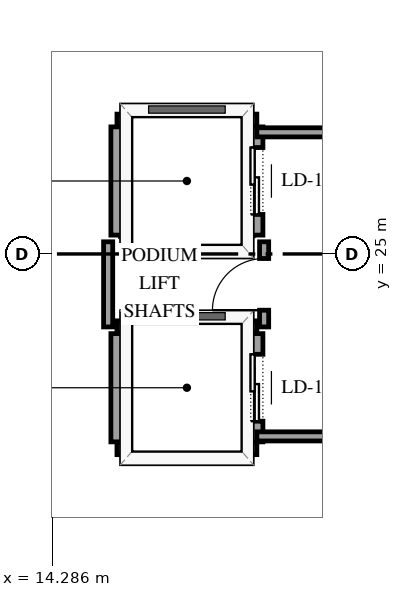
"""IFC4 building model, lengths in metres.
Left out: names, types, materials, properties, quantities, classifications, styles, units other than length and angle.
Written with IfcOpenShell. Run it as: python <this file> out.ifc"""

import sys

from ifc_helpers import new_model, si_unit, direction, frame, frame_2d, origin, place, context, subcontext, project, spatial, rectangle, extrude, element, fill, save


model = new_model("IFC4")
c1 = context("Model", 3, precision=1e-05, world=origin(), true_north=direction((0.0, 1.0)))
c2 = subcontext(c1, "Body", "Model", "MODEL_VIEW")
j1 = project(units=[si_unit("LENGTHUNIT", "METRE"), si_unit("PLANEANGLEUNIT", "RADIAN")], contexts=[c1])
p1 = place(None, origin())
s1 = spatial("IfcSite", under=j1, at=p1, CompositionType="ELEMENT")
p2 = place(p1, origin())
s2 = spatial("IfcBuilding", under=s1, at=p2, CompositionType="ELEMENT")
p3 = place(p2, frame((0.0, 0.0, -5.4)))
s3 = spatial("IfcBuildingStorey", under=s2, at=p3, CompositionType="ELEMENT", Elevation=-5.4)
for number, where, z_axis, x_axis in (
    (1, (15.35, 21.8, 0.0), (0.0, 0.0, 1.0), (1.0, 0.0, 0.0)),
    (2, (15.35, 23.8, 0.0), (0.0, 0.0, 1.0), (1.0, 0.0, 0.0)),
):
    element("IfcWall", number, at=place(p3, frame(where, z_axis=z_axis, x_axis=x_axis)), inside=s3, PredefinedType="SOLIDWALL", context=c2, shape_type="SweptSolid", body=[
        extrude(rectangle(XDim=2.3, YDim=0.2, at=frame_2d((1.15, 0.0))), origin(), (0.0, 0.0, 1.0), 5.08),
    ])
p4 = place(p3, frame((15.35, 21.91, 0.0), z_axis=(0.0, 0.0, 1.0), x_axis=(0.0, 1.0, 0.0)))
e3 = element("IfcWall", 3, at=p4, inside=s3, PredefinedType="SOLIDWALL", context=c2, shape_type="SweptSolid", body=[
    extrude(rectangle(XDim=1.78, YDim=0.2, at=frame_2d((0.89, 0.0))), origin(), (0.0, 0.0, 1.0), 5.08),
])
p5 = place(p3, frame((17.65, 21.91, 0.0), z_axis=(0.0, 0.0, 1.0), x_axis=(0.0, 1.0, 0.0)))
e4 = element("IfcWall", 4, at=p5, inside=s3, PredefinedType="SOLIDWALL", context=c2, shape_type="SweptSolid", body=[
    extrude(rectangle(XDim=1.78, YDim=0.2, at=frame_2d((0.89, 0.0))), origin(), (0.0, 0.0, 1.0), 5.08),
])
p6 = place(p5, frame((0.34, 0.0, 0.0)))
e5 = element("IfcOpeningElement", 5, at=p6, cuts=e4, PredefinedType="OPENING", context=c2, shape_type="SweptSolid", body=[
    extrude(rectangle(XDim=1.1, YDim=2.15, at=frame_2d((0.55, 1.075))), frame((0.0, 0.11, 0.0), z_axis=(0.0, -1.0, 0.0), x_axis=(1.0, 0.0, 0.0)), (0.0, 0.0, 1.0), 0.22),
])
p7 = place(p3, frame((15.35, 27.2, 0.0), z_axis=(0.0, 0.0, 1.0), x_axis=(1.0, 0.0, 0.0)))
e6 = element("IfcWall", 6, at=p7, inside=s3, PredefinedType="SOLIDWALL", context=c2, shape_type="SweptSolid", body=[
    extrude(rectangle(XDim=2.3, YDim=0.2, at=frame_2d((1.15, 0.0))), origin(), (0.0, 0.0, 1.0), 5.08),
])
p8 = place(p3, frame((15.35, 25.31, 0.0), z_axis=(0.0, 0.0, 1.0), x_axis=(0.0, 1.0, 0.0)))
e7 = element("IfcWall", 7, at=p8, inside=s3, PredefinedType="SOLIDWALL", context=c2, shape_type="SweptSolid", body=[
    extrude(rectangle(XDim=1.78, YDim=0.2, at=frame_2d((0.89, 0.0))), origin(), (0.0, 0.0, 1.0), 5.08),
])
p9 = place(p3, frame((17.65, 25.31, 0.0), z_axis=(0.0, 0.0, 1.0), x_axis=(0.0, 1.0, 0.0)))
e8 = element("IfcWall", 8, at=p9, inside=s3, PredefinedType="SOLIDWALL", context=c2, shape_type="SweptSolid", body=[
    extrude(rectangle(XDim=1.78, YDim=0.2, at=frame_2d((0.89, 0.0))), origin(), (0.0, 0.0, 1.0), 5.08),
])
p10 = place(p9, frame((0.34, 0.0, 0.0)))
e9 = element("IfcOpeningElement", 9, at=p10, cuts=e8, PredefinedType="OPENING", context=c2, shape_type="SweptSolid", body=[
    extrude(rectangle(XDim=1.1, YDim=2.15, at=frame_2d((0.55, 1.075))), frame((0.0, 0.11, 0.0), z_axis=(0.0, -1.0, 0.0), x_axis=(1.0, 0.0, 0.0)), (0.0, 0.0, 1.0), 0.22),
])
p11 = place(p3, frame((30.53, 22.0, 0.0), z_axis=(0.0, 0.0, 1.0), x_axis=(-1.0, 0.0, 0.0)))
e10 = element("IfcWall", 10, at=p11, inside=s3, PredefinedType="PARTITIONING", context=c2, shape_type="SweptSolid", body=[
    extrude(rectangle(XDim=12.88, YDim=0.15, at=frame_2d((6.44, 0.0))), origin(), (0.0, 0.0, 1.0), 5.08),
])
p12 = place(p11, frame((5.965, 0.0, 0.0)))
e11 = element("IfcOpeningElement", 11, at=p12, cuts=e10, PredefinedType="OPENING", context=c2, shape_type="SweptSolid", body=[
    extrude(rectangle(XDim=0.92, YDim=2.12, at=frame_2d((0.46, 1.06))), frame((0.0, 0.085, 0.0), z_axis=(0.0, -1.0, 0.0), x_axis=(1.0, 0.0, 0.0)), (0.0, 0.0, 1.0), 0.17),
])
p13 = place(p3, frame((17.65, 27.0, 0.0), z_axis=(0.0, 0.0, 1.0), x_axis=(1.0, 0.0, 0.0)))
e12 = element("IfcWall", 12, at=p13, inside=s3, PredefinedType="PARTITIONING", context=c2, shape_type="SweptSolid", body=[
    extrude(rectangle(XDim=12.88, YDim=0.15, at=frame_2d((6.44, 0.0))), origin(), (0.0, 0.0, 1.0), 5.08),
])
p14 = place(p3, frame((17.77, 23.8, 0.0), z_axis=(0.0, 0.0, 1.0), x_axis=(0.0, 1.0, 0.0)))
e13 = element("IfcWall", 13, at=p14, inside=s3, PredefinedType="PARTITIONING", context=c2, shape_type="SweptSolid", body=[
    extrude(rectangle(XDim=1.4, YDim=0.15, at=frame_2d((0.7, 0.0))), origin(), (0.0, 0.0, 1.0), 5.08),
])
p15 = place(p14, frame((0.275, 0.0, 0.0)))
e14 = element("IfcOpeningElement", 14, at=p15, cuts=e13, PredefinedType="OPENING", context=c2, shape_type="SweptSolid", body=[
    extrude(rectangle(XDim=0.85, YDim=2.1, at=frame_2d((0.425, 1.05))), frame((0.0, 0.085, 0.0), z_axis=(0.0, -1.0, 0.0), x_axis=(1.0, 0.0, 0.0)), (0.0, 0.0, 1.0), 0.17),
])
p16 = place(p3, frame((15.205, 23.8, 0.0), z_axis=(0.0, 0.0, 1.0), x_axis=(0.0, 1.0, 0.0)))
e15 = element("IfcWall", 15, at=p16, inside=s3, PredefinedType="PARTITIONING", context=c2, shape_type="SweptSolid", body=[
    extrude(rectangle(XDim=1.4, YDim=0.15, at=frame_2d((0.7, 0.0))), origin(), (0.0, 0.0, 1.0), 5.08),
])
p17 = place(p6, origin())
e16 = element("IfcDoor", 16, at=p17, inside=s3, OperationType="SLIDING_TO_LEFT", PredefinedType="DOOR", context=c2, shape_type="SweptSolid", body=[
    extrude(rectangle(XDim=1.1, YDim=2.15, at=frame_2d((0.55, 1.075))), frame((0.0, 0.025, 0.0), z_axis=(0.0, -1.0, 0.0), x_axis=(1.0, 0.0, 0.0)), (0.0, 0.0, 1.0), 0.05),
])
fill(e5, e16)
p18 = place(p10, origin())
e17 = element("IfcDoor", 17, at=p18, inside=s3, OperationType="SLIDING_TO_LEFT", PredefinedType="DOOR", context=c2, shape_type="SweptSolid", body=[
    extrude(rectangle(XDim=1.1, YDim=2.15, at=frame_2d((0.55, 1.075))), frame((0.0, 0.025, 0.0), z_axis=(0.0, -1.0, 0.0), x_axis=(1.0, 0.0, 0.0)), (0.0, 0.0, 1.0), 0.05),
])
fill(e9, e17)
p19 = place(p15, origin())
e18 = element("IfcDoor", 18, at=p19, inside=s3, OperationType="SINGLE_SWING_LEFT", PredefinedType="DOOR", context=c2, shape_type="SweptSolid", body=[
    extrude(rectangle(XDim=0.85, YDim=2.1, at=frame_2d((0.425, 1.05))), frame((0.0, 0.025, 0.0), z_axis=(0.0, -1.0, 0.0), x_axis=(1.0, 0.0, 0.0)), (0.0, 0.0, 1.0), 0.05),
])
fill(e14, e18)
save(model, sys.argv[1])
